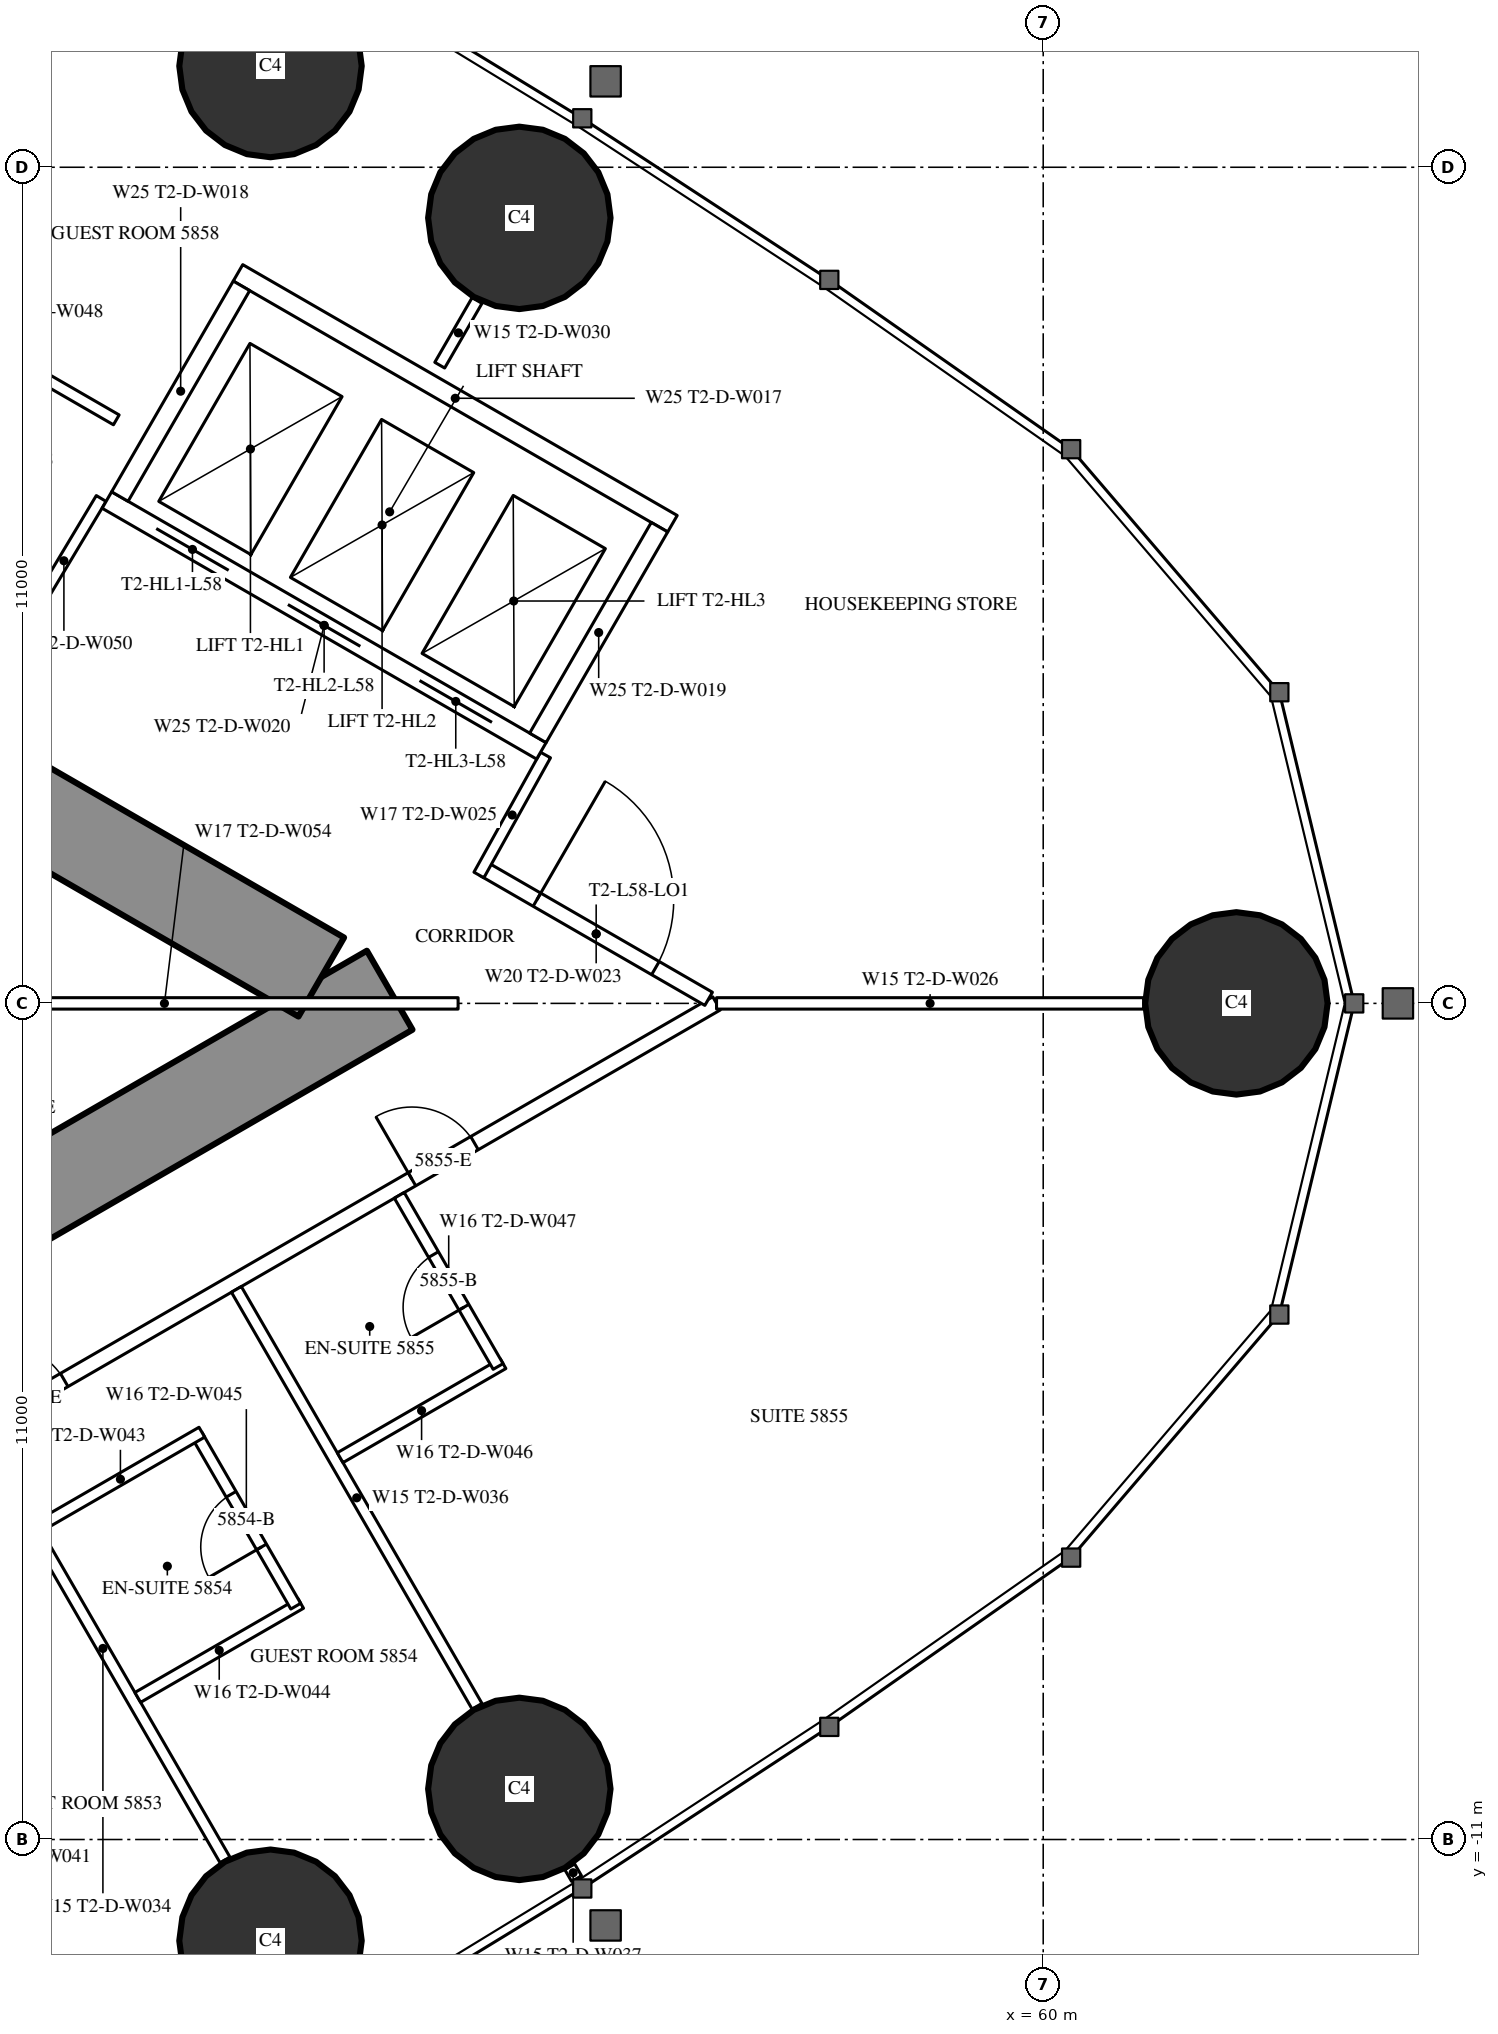
"""IFC4 building model, lengths in metres.
Left out: names, types, materials, properties, quantities, classifications, styles, units other than length and angle.
Written with IfcOpenShell. Run it as: python <this file> out.ifc"""

import sys

from ifc_helpers import new_model, si_unit, direction, frame, frame_2d, origin, origin_2d, place, context, subcontext, project, spatial, rectangle, circle, extrude, element, fill, save


model = new_model("IFC4")
c1 = context("Model", 3, precision=1e-05, world=origin(), true_north=direction((0.0, 1.0)))
c2 = subcontext(c1, "Body", "Model", "MODEL_VIEW")
j1 = project(units=[si_unit("LENGTHUNIT", "METRE"), si_unit("PLANEANGLEUNIT", "RADIAN")], contexts=[c1])
p1 = place(None, origin())
s1 = spatial("IfcSite", under=j1, at=p1, CompositionType="ELEMENT")
p2 = place(p1, origin())
s2 = spatial("IfcBuilding", under=s1, at=p2, CompositionType="ELEMENT")
p3 = place(p2, frame((0.0, 0.0, 218.9)))
s3 = spatial("IfcBuildingStorey", under=s2, at=p3, CompositionType="ELEMENT", Elevation=218.9)
for number, where, z_axis, x_axis in (
    (1, (62.542, 0.0, 0.0), (0.0, 0.0, 1.0), (1.0, 0.0, 0.0)),
    (2, (53.108, 10.334, 0.0), (0.0, 0.0, 1.0), (1.0, 0.0, 0.0)),
    (3, (49.834, 12.332, 0.0), (0.0, 0.0, 1.0), (1.0, 0.0, 0.0)),
    (4, (49.834, -12.332, 0.0), (0.0, 0.0, 1.0), (1.0, 0.0, 0.0)),
    (5, (53.108, -10.334, 0.0), (0.0, 0.0, 1.0), (1.0, 0.0, 0.0)),
):
    element("IfcColumn", number, at=place(p3, frame(where, z_axis=z_axis, x_axis=x_axis)), inside=s3, PredefinedType="COLUMN", context=c2, shape_type="SweptSolid", body=[
        extrude(circle(Radius=1.2, at=origin_2d()), origin(), (0.0, 0.0, 1.0), 3.6),
    ])
p4 = place(p3, frame((27.2, -13.8, 0.0), z_axis=(0.0, 0.0, 1.0), x_axis=(0.866027159892, 0.499996958321, 0.0)))
e6 = element("IfcWall", 6, at=p4, inside=s3, PredefinedType="SHEAR", context=c2, shape_type="SweptSolid", body=[
    extrude(rectangle(XDim=27.947, YDim=1.2, at=frame_2d((13.973, 0.0))), origin(), (0.0, 0.0, 1.0), 3.6),
])
p5 = place(p4, frame((4.6, 0.0, 0.0)))
e7 = element("IfcOpeningElement", 7, at=p5, cuts=e6, PredefinedType="OPENING", context=c2, shape_type="SweptSolid", body=[
    extrude(rectangle(XDim=1.0, YDim=2.2, at=frame_2d((0.5, 1.1))), frame((0.0, 0.61, 0.0), z_axis=(0.0, -1.0, 0.0), x_axis=(1.0, 0.0, 0.0)), (0.0, 0.0, 1.0), 1.22),
])
p6 = place(p4, frame((13.395, 0.0, 0.0)))
e8 = element("IfcOpeningElement", 8, at=p6, cuts=e6, PredefinedType="OPENING", context=c2, shape_type="SweptSolid", body=[
    extrude(rectangle(XDim=1.8, YDim=2.2, at=frame_2d((0.9, 1.1))), frame((0.0, 0.61, 0.0), z_axis=(0.0, -1.0, 0.0), x_axis=(1.0, 0.0, 0.0)), (0.0, 0.0, 1.0), 1.22),
])
p7 = place(p3, frame((27.2, 13.8, 0.0), z_axis=(0.0, 0.0, 1.0), x_axis=(0.866024515034, -0.500001539357, 0.0)))
e9 = element("IfcWall", 9, at=p7, inside=s3, PredefinedType="SHEAR", context=c2, shape_type="SweptSolid", body=[
    extrude(rectangle(XDim=26.907, YDim=1.2, at=frame_2d((13.454, 0.0))), origin(), (0.0, 0.0, 1.0), 3.6),
])
p8 = place(p7, frame((4.6, 0.0, 0.0)))
e10 = element("IfcOpeningElement", 10, at=p8, cuts=e9, PredefinedType="OPENING", context=c2, shape_type="SweptSolid", body=[
    extrude(rectangle(XDim=1.0, YDim=2.2, at=frame_2d((0.5, 1.1))), frame((0.0, 0.61, 0.0), z_axis=(0.0, -1.0, 0.0), x_axis=(1.0, 0.0, 0.0)), (0.0, 0.0, 1.0), 1.22),
])
p9 = place(p7, frame((13.395, 0.0, 0.0)))
e11 = element("IfcOpeningElement", 11, at=p9, cuts=e9, PredefinedType="OPENING", context=c2, shape_type="SweptSolid", body=[
    extrude(rectangle(XDim=1.8, YDim=2.2, at=frame_2d((0.9, 1.1))), frame((0.0, 0.61, 0.0), z_axis=(0.0, -1.0, 0.0), x_axis=(1.0, 0.0, 0.0)), (0.0, 0.0, 1.0), 1.22),
])
p10 = place(p3, frame((28.959, -15.44, 0.0), z_axis=(0.0, 0.0, 1.0), x_axis=(0.866025227435, 0.500000305447, 0.0)))
e12 = element("IfcWall", 12, at=p10, inside=s3, PredefinedType="PARTITIONING", context=c2, shape_type="SweptSolid", body=[
    extrude(rectangle(XDim=30.88, YDim=0.2, at=frame_2d((15.44, 0.0))), origin(), (0.0, 0.0, 1.0), 3.35),
])
p11 = place(p10, frame((1.494, 0.0, 0.0)))
e13 = element("IfcOpeningElement", 13, at=p11, cuts=e12, PredefinedType="OPENING", context=c2, shape_type="SweptSolid", body=[
    extrude(rectangle(XDim=1.8, YDim=2.03, at=frame_2d((0.9, 1.015))), frame((0.0, 0.11, 0.0), z_axis=(0.0, -1.0, 0.0), x_axis=(1.0, 0.0, 0.0)), (0.0, 0.0, 1.0), 0.22),
])
p12 = place(p10, frame((7.687, 0.0, 0.0)))
e14 = element("IfcOpeningElement", 14, at=p12, cuts=e12, PredefinedType="OPENING", context=c2, shape_type="SweptSolid", body=[
    extrude(rectangle(XDim=1.0, YDim=2.2, at=frame_2d((0.5, 1.1))), frame((0.0, 0.11, 0.0), z_axis=(0.0, -1.0, 0.0), x_axis=(1.0, 0.0, 0.0)), (0.0, 0.0, 1.0), 0.22),
])
p13 = place(p10, frame((16.137, 0.0, 0.0)))
e15 = element("IfcOpeningElement", 15, at=p13, cuts=e12, PredefinedType="OPENING", context=c2, shape_type="SweptSolid", body=[
    extrude(rectangle(XDim=0.95, YDim=2.2, at=frame_2d((0.475, 1.1))), frame((0.0, 0.11, 0.0), z_axis=(0.0, -1.0, 0.0), x_axis=(1.0, 0.0, 0.0)), (0.0, 0.0, 1.0), 0.22),
])
p14 = place(p10, frame((20.021, 0.0, 0.0)))
e16 = element("IfcOpeningElement", 16, at=p14, cuts=e12, PredefinedType="OPENING", context=c2, shape_type="SweptSolid", body=[
    extrude(rectangle(XDim=0.95, YDim=2.2, at=frame_2d((0.475, 1.1))), frame((0.0, 0.11, 0.0), z_axis=(0.0, -1.0, 0.0), x_axis=(1.0, 0.0, 0.0)), (0.0, 0.0, 1.0), 0.22),
])
p15 = place(p10, frame((26.253, 0.0, 0.0)))
e17 = element("IfcOpeningElement", 17, at=p15, cuts=e12, PredefinedType="OPENING", context=c2, shape_type="SweptSolid", body=[
    extrude(rectangle(XDim=0.95, YDim=2.2, at=frame_2d((0.475, 1.1))), frame((0.0, 0.11, 0.0), z_axis=(0.0, -1.0, 0.0), x_axis=(1.0, 0.0, 0.0)), (0.0, 0.0, 1.0), 0.22),
])
p16 = place(p3, frame((46.023, -5.704, 0.0), z_axis=(0.0, 0.0, 1.0), x_axis=(0.499984478165, -0.866034365135, 0.0)))
e18 = element("IfcWall", 18, at=p16, inside=s3, PredefinedType="PARTITIONING", context=c2, shape_type="SweptSolid", body=[
    extrude(rectangle(XDim=6.426, YDim=0.15, at=frame_2d((3.213, 0.0))), origin(), (0.0, 0.0, 1.0), 2.45),
])
p17 = place(p3, frame((49.385, -3.763, 0.0), z_axis=(0.0, 0.0, 1.0), x_axis=(0.499999447814, -0.866025722589, 0.0)))
e19 = element("IfcWall", 19, at=p17, inside=s3, PredefinedType="PARTITIONING", context=c2, shape_type="SweptSolid", body=[
    extrude(rectangle(XDim=6.333, YDim=0.15, at=frame_2d((3.166, 0.0))), origin(), (0.0, 0.0, 1.0), 2.45),
])
p18 = place(p3, frame((53.771, -11.36, 0.0), z_axis=(0.0, 0.0, 1.0), x_axis=(0.499524978789, -0.866299483762, 0.0)))
e20 = element("IfcWall", 20, at=p18, inside=s3, PredefinedType="PARTITIONING", context=c2, shape_type="SweptSolid", body=[
    extrude(rectangle(XDim=0.178, YDim=0.15, at=frame_2d((0.089, 0.0))), origin(), (0.0, 0.0, 1.0), 2.45),
])
p19 = place(p3, frame((55.702, 0.0, 0.0), z_axis=(0.0, 0.0, 1.0), x_axis=(1.0, 0.0, 0.0)))
e21 = element("IfcWall", 21, at=p19, inside=s3, PredefinedType="PARTITIONING", context=c2, shape_type="SweptSolid", body=[
    extrude(rectangle(XDim=5.619, YDim=0.15, at=frame_2d((2.81, 0.0))), origin(), (0.0, 0.0, 1.0), 2.45),
])
p20 = place(p3, frame((52.06, 8.396, 0.0), z_axis=(0.0, 0.0, 1.0), x_axis=(0.500095379624, 0.865970329329, 0.0)))
e22 = element("IfcWall", 22, at=p20, inside=s3, PredefinedType="PARTITIONING", context=c2, shape_type="SweptSolid", body=[
    extrude(rectangle(XDim=0.982, YDim=0.15, at=frame_2d((0.491, 0.0))), origin(), (0.0, 0.0, 1.0), 3.35),
])
p21 = place(p3, frame((52.639, 1.769, 0.0), z_axis=(0.0, 0.0, 1.0), x_axis=(0.866027340901, -0.4999966448, 0.0)))
e23 = element("IfcWall", 23, at=p21, inside=s3, PredefinedType="PARTITIONING", context=c2, shape_type="SweptSolid", body=[
    extrude(rectangle(XDim=3.417, YDim=0.2, at=frame_2d((1.708, 0.0))), origin(), (0.0, 0.0, 1.0), 3.35),
])
p22 = place(p21, frame((0.809, 0.0, 0.0)))
e24 = element("IfcOpeningElement", 24, at=p22, cuts=e23, PredefinedType="OPENING", context=c2, shape_type="SweptSolid", body=[
    extrude(rectangle(XDim=1.8, YDim=2.2, at=frame_2d((0.9, 1.1))), frame((0.0, 0.11, 0.0), z_axis=(0.0, -1.0, 0.0), x_axis=(1.0, 0.0, 0.0)), (0.0, 0.0, 1.0), 0.22),
])
p23 = place(p3, frame((47.606, 6.642, 0.0), z_axis=(0.0, 0.0, 1.0), x_axis=(-0.51353662755, -0.858067673418, 0.0)))
e25 = element("IfcWall", 25, at=p23, inside=s3, PredefinedType="PARTITIONING", context=c2, shape_type="SweptSolid", body=[
    extrude(rectangle(XDim=1.91, YDim=0.15, at=frame_2d((0.955, 0.0))), origin(), (0.0, 0.0, 1.0), 3.35),
])
p24 = place(p3, frame((52.576, 1.689, 0.0), z_axis=(0.0, 0.0, 1.0), x_axis=(0.485424724123, 0.874278466629, 0.0)))
e26 = element("IfcWall", 26, at=p24, inside=s3, PredefinedType="PARTITIONING", context=c2, shape_type="SweptSolid", body=[
    extrude(rectangle(XDim=1.805, YDim=0.15, at=frame_2d((0.903, 0.0))), origin(), (0.0, 0.0, 1.0), 3.35),
])
p25 = place(p3, frame((48.088, -9.13, 0.0), z_axis=(0.0, 0.0, 1.0), x_axis=(0.86604923931, 0.499958713387, 0.0)))
e27 = element("IfcWall", 27, at=p25, inside=s3, PredefinedType="PARTITIONING", context=c2, shape_type="SweptSolid", body=[
    extrude(rectangle(XDim=2.475, YDim=0.15, at=frame_2d((1.237, 0.0))), origin(), (0.0, 0.0, 1.0), 3.35),
])
p26 = place(p3, frame((48.866, -5.679, 0.0), z_axis=(0.0, 0.0, 1.0), x_axis=(0.500006934395, -0.866021400173, 0.0)))
e28 = element("IfcWall", 28, at=p26, inside=s3, PredefinedType="PARTITIONING", context=c2, shape_type="SweptSolid", body=[
    extrude(rectangle(XDim=2.6, YDim=0.15, at=frame_2d((1.3, 0.0))), origin(), (0.0, 0.0, 1.0), 3.35),
])
p27 = place(p26, frame((0.9, 0.0, 0.0)))
e29 = element("IfcOpeningElement", 29, at=p27, cuts=e28, PredefinedType="OPENING", context=c2, shape_type="SweptSolid", body=[
    extrude(rectangle(XDim=0.8, YDim=2.2, at=frame_2d((0.4, 1.1))), frame((0.0, 0.085, 0.0), z_axis=(0.0, -1.0, 0.0), x_axis=(1.0, 0.0, 0.0)), (0.0, 0.0, 1.0), 0.17),
])
p28 = place(p3, frame((46.788, -6.879, 0.0), z_axis=(0.0, 0.0, 1.0), x_axis=(0.866006523861, 0.500032699561, 0.0)))
e30 = element("IfcWall", 30, at=p28, inside=s3, PredefinedType="PARTITIONING", context=c2, shape_type="SweptSolid", body=[
    extrude(rectangle(XDim=2.475, YDim=0.15, at=frame_2d((1.237, 0.0))), origin(), (0.0, 0.0, 1.0), 3.35),
])
p29 = place(p3, frame((50.75, -5.977, 0.0), z_axis=(0.0, 0.0, 1.0), x_axis=(0.866031185235, 0.4999899861, 0.0)))
e31 = element("IfcWall", 31, at=p29, inside=s3, PredefinedType="PARTITIONING", context=c2, shape_type="SweptSolid", body=[
    extrude(rectangle(XDim=2.475, YDim=0.15, at=frame_2d((1.238, 0.0))), origin(), (0.0, 0.0, 1.0), 3.35),
])
p30 = place(p3, frame((51.529, -2.525, 0.0), z_axis=(0.0, 0.0, 1.0), x_axis=(0.500006934395, -0.866021400173, 0.0)))
e32 = element("IfcWall", 32, at=p30, inside=s3, PredefinedType="PARTITIONING", context=c2, shape_type="SweptSolid", body=[
    extrude(rectangle(XDim=2.6, YDim=0.15, at=frame_2d((1.3, 0.0))), origin(), (0.0, 0.0, 1.0), 3.35),
])
p31 = place(p30, frame((0.9, 0.0, 0.0)))
e33 = element("IfcOpeningElement", 33, at=p31, cuts=e32, PredefinedType="OPENING", context=c2, shape_type="SweptSolid", body=[
    extrude(rectangle(XDim=0.8, YDim=2.2, at=frame_2d((0.4, 1.1))), frame((0.0, 0.085, 0.0), z_axis=(0.0, -1.0, 0.0), x_axis=(1.0, 0.0, 0.0)), (0.0, 0.0, 1.0), 0.17),
])
p32 = place(p3, frame((45.662, 8.914, 0.0), z_axis=(0.0, 0.0, 1.0), x_axis=(0.86604923931, -0.499958713387, 0.0)))
e34 = element("IfcWall", 34, at=p32, inside=s3, PredefinedType="PARTITIONING", context=c2, shape_type="SweptSolid", body=[
    extrude(rectangle(XDim=2.475, YDim=0.15, at=frame_2d((1.237, 0.0))), origin(), (0.0, 0.0, 1.0), 3.35),
])
p33 = place(p3, frame((44.575, 0.0, 0.0), z_axis=(0.0, 0.0, 1.0), x_axis=(1.0, 0.0, 0.0)))
e35 = element("IfcWall", 35, at=p33, inside=s3, PredefinedType="PARTITIONING", context=c2, shape_type="SweptSolid", body=[
    extrude(rectangle(XDim=7.727, YDim=0.15, at=frame_2d((3.864, 0.0))), origin(), (0.0, 0.0, 1.0), 2.45),
])
p34 = place(p3, frame((47.681, 6.622, 0.0), z_axis=(0.0, 0.0, 1.0), x_axis=(0.86603344179, -0.499986077507, 0.0)))
e36 = element("IfcWall", 36, at=p34, inside=s3, PredefinedType="PARTITIONING", context=c2, shape_type="SweptSolid", body=[
    extrude(rectangle(XDim=6.6, YDim=0.25, at=frame_2d((3.3, 0.0))), origin(), (0.0, 0.0, 1.0), 3.35),
])
p35 = place(p34, frame((0.75, 0.0, 0.0)))
e37 = element("IfcOpeningElement", 37, at=p35, cuts=e36, PredefinedType="OPENING", context=c2, shape_type="SweptSolid", body=[
    extrude(rectangle(XDim=1.1, YDim=2.2, at=frame_2d((0.55, 1.1))), frame((0.0, 0.135, 0.0), z_axis=(0.0, -1.0, 0.0), x_axis=(1.0, 0.0, 0.0)), (0.0, 0.0, 1.0), 0.27),
])
p36 = place(p34, frame((2.75, 0.0, 0.0)))
e38 = element("IfcOpeningElement", 38, at=p36, cuts=e36, PredefinedType="OPENING", context=c2, shape_type="SweptSolid", body=[
    extrude(rectangle(XDim=1.1, YDim=2.2, at=frame_2d((0.55, 1.1))), frame((0.0, 0.135, 0.0), z_axis=(0.0, -1.0, 0.0), x_axis=(1.0, 0.0, 0.0)), (0.0, 0.0, 1.0), 0.27),
])
p37 = place(p34, frame((4.75, 0.0, 0.0)))
e39 = element("IfcOpeningElement", 39, at=p37, cuts=e36, PredefinedType="OPENING", context=c2, shape_type="SweptSolid", body=[
    extrude(rectangle(XDim=1.1, YDim=2.2, at=frame_2d((0.55, 1.1))), frame((0.0, 0.135, 0.0), z_axis=(0.0, -1.0, 0.0), x_axis=(1.0, 0.0, 0.0)), (0.0, 0.0, 1.0), 0.27),
])
p38 = place(p3, frame((49.406, 9.611, 0.0), z_axis=(0.0, 0.0, 1.0), x_axis=(0.86603344179, -0.499986077507, 0.0)))
e40 = element("IfcWall", 40, at=p38, inside=s3, PredefinedType="PARTITIONING", context=c2, shape_type="SweptSolid", body=[
    extrude(rectangle(XDim=6.6, YDim=0.25, at=frame_2d((3.3, 0.0))), origin(), (0.0, 0.0, 1.0), 3.35),
])
p39 = place(p3, frame((47.852, 6.668, 0.0), z_axis=(0.0, 0.0, 1.0), x_axis=(0.499929347863, 0.866066190972, 0.0)))
e41 = element("IfcWall", 41, at=p39, inside=s3, PredefinedType="PARTITIONING", context=c2, shape_type="SweptSolid", body=[
    extrude(rectangle(XDim=3.201, YDim=0.25, at=frame_2d((1.6, 0.0))), origin(), (0.0, 0.0, 1.0), 3.35),
])
p40 = place(p3, frame((53.352, 3.493, 0.0), z_axis=(0.0, 0.0, 1.0), x_axis=(0.499872130319, 0.866099216793, 0.0)))
e42 = element("IfcWall", 42, at=p40, inside=s3, PredefinedType="PARTITIONING", context=c2, shape_type="SweptSolid", body=[
    extrude(rectangle(XDim=3.2, YDim=0.25, at=frame_2d((1.6, 0.0))), origin(), (0.0, 0.0, 1.0), 3.35),
])
p41 = place(p27, origin())
e43 = element("IfcDoor", 43, at=p41, inside=s3, OperationType="SINGLE_SWING_RIGHT", PredefinedType="DOOR", context=c2, shape_type="SweptSolid", body=[
    extrude(rectangle(XDim=0.8, YDim=2.2, at=frame_2d((0.4, 1.1))), frame((0.0, 0.025, 0.0), z_axis=(0.0, -1.0, 0.0), x_axis=(1.0, 0.0, 0.0)), (0.0, 0.0, 1.0), 0.05),
])
fill(e29, e43)
p42 = place(p14, origin())
e44 = element("IfcDoor", 44, at=p42, inside=s3, OperationType="SINGLE_SWING_LEFT", PredefinedType="DOOR", context=c2, shape_type="SweptSolid", body=[
    extrude(rectangle(XDim=0.95, YDim=2.2, at=frame_2d((0.475, 1.1))), frame((0.0, 0.025, 0.0), z_axis=(0.0, -1.0, 0.0), x_axis=(1.0, 0.0, 0.0)), (0.0, 0.0, 1.0), 0.05),
])
fill(e16, e44)
p43 = place(p31, origin())
e45 = element("IfcDoor", 45, at=p43, inside=s3, OperationType="SINGLE_SWING_RIGHT", PredefinedType="DOOR", context=c2, shape_type="SweptSolid", body=[
    extrude(rectangle(XDim=0.8, YDim=2.2, at=frame_2d((0.4, 1.1))), frame((0.0, 0.025, 0.0), z_axis=(0.0, -1.0, 0.0), x_axis=(1.0, 0.0, 0.0)), (0.0, 0.0, 1.0), 0.05),
])
fill(e33, e45)
p44 = place(p15, origin())
e46 = element("IfcDoor", 46, at=p44, inside=s3, OperationType="SINGLE_SWING_LEFT", PredefinedType="DOOR", context=c2, shape_type="SweptSolid", body=[
    extrude(rectangle(XDim=0.95, YDim=2.2, at=frame_2d((0.475, 1.1))), frame((0.0, 0.025, 0.0), z_axis=(0.0, -1.0, 0.0), x_axis=(1.0, 0.0, 0.0)), (0.0, 0.0, 1.0), 0.05),
])
fill(e17, e46)
p45 = place(p22, origin())
e47 = element("IfcDoor", 47, at=p45, inside=s3, OperationType="DOUBLE_DOOR_SINGLE_SWING", PredefinedType="DOOR", context=c2, shape_type="SweptSolid", body=[
    extrude(rectangle(XDim=1.8, YDim=2.2, at=frame_2d((0.9, 1.1))), frame((0.0, 0.025, 0.0), z_axis=(0.0, -1.0, 0.0), x_axis=(1.0, 0.0, 0.0)), (0.0, 0.0, 1.0), 0.05),
])
fill(e24, e47)
p46 = place(p35, origin())
e48 = element("IfcDoor", 48, at=p46, inside=s3, OperationType="DOUBLE_DOOR_SLIDING", PredefinedType="USERDEFINED", context=c2, shape_type="SweptSolid", body=[
    extrude(rectangle(XDim=1.1, YDim=2.2, at=frame_2d((0.55, 1.1))), frame((0.0, 0.025, 0.0), z_axis=(0.0, -1.0, 0.0), x_axis=(1.0, 0.0, 0.0)), (0.0, 0.0, 1.0), 0.05),
])
fill(e37, e48)
p47 = place(p36, origin())
e49 = element("IfcDoor", 49, at=p47, inside=s3, OperationType="DOUBLE_DOOR_SLIDING", PredefinedType="USERDEFINED", context=c2, shape_type="SweptSolid", body=[
    extrude(rectangle(XDim=1.1, YDim=2.2, at=frame_2d((0.55, 1.1))), frame((0.0, 0.025, 0.0), z_axis=(0.0, -1.0, 0.0), x_axis=(1.0, 0.0, 0.0)), (0.0, 0.0, 1.0), 0.05),
])
fill(e38, e49)
p48 = place(p37, origin())
e50 = element("IfcDoor", 50, at=p48, inside=s3, OperationType="DOUBLE_DOOR_SLIDING", PredefinedType="USERDEFINED", context=c2, shape_type="SweptSolid", body=[
    extrude(rectangle(XDim=1.1, YDim=2.2, at=frame_2d((0.55, 1.1))), frame((0.0, 0.025, 0.0), z_axis=(0.0, -1.0, 0.0), x_axis=(1.0, 0.0, 0.0)), (0.0, 0.0, 1.0), 0.05),
])
fill(e39, e50)
save(model, sys.argv[1])
